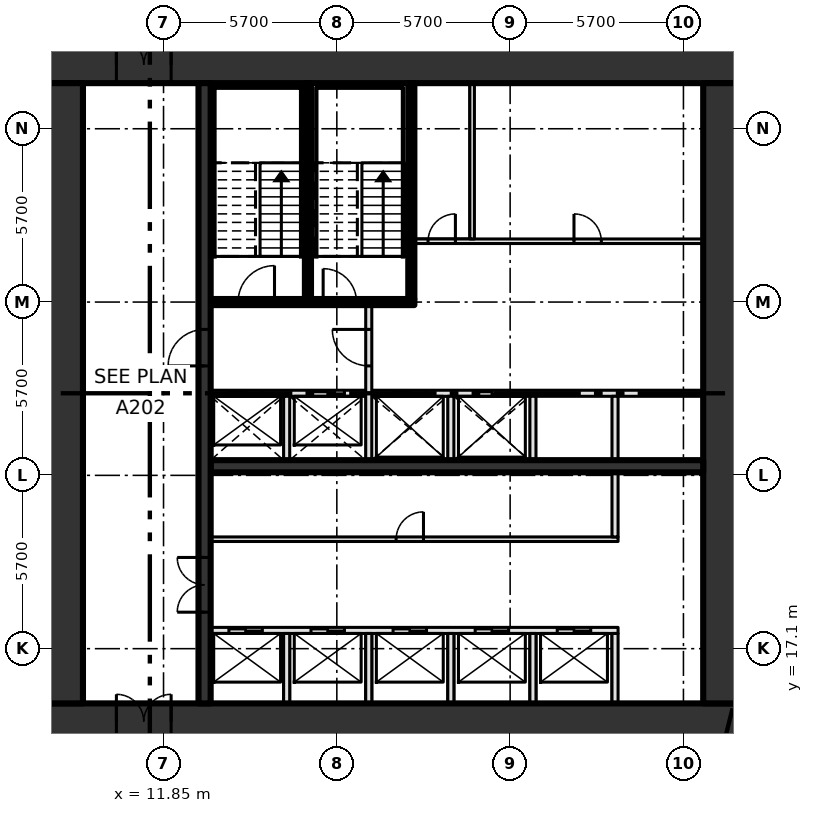
"""IFC4 building model, lengths in metres.
Left out: names, types, materials, properties, quantities, classifications, styles, units other than length and angle.
Written with IfcOpenShell. Run it as: python <this file> out.ifc"""

import sys

from ifc_helpers import new_model, si_unit, direction, frame, frame_2d, origin, place, context, subcontext, project, spatial, rectangle, extrude, element, fill, save


model = new_model("IFC4")
c1 = context("Model", 3, precision=1e-05, world=origin(), true_north=direction((0.0, 1.0)))
c2 = subcontext(c1, "Body", "Model", "MODEL_VIEW")
j1 = project(units=[si_unit("LENGTHUNIT", "METRE"), si_unit("PLANEANGLEUNIT", "RADIAN")], contexts=[c1])
p1 = place(None, origin())
s1 = spatial("IfcSite", under=j1, at=p1, CompositionType="ELEMENT")
p2 = place(p1, origin())
s2 = spatial("IfcBuilding", under=s1, at=p2, CompositionType="ELEMENT")
p3 = place(p2, frame((0.0, 0.0, -4.5)))
s3 = spatial("IfcBuildingStorey", under=s2, at=p3, CompositionType="ELEMENT", Elevation=-4.5)
p4 = place(p3, frame((8.0, 14.7, -0.45), z_axis=(0.0, 0.0, 1.0), x_axis=(1.0, 0.0, 0.0)))
e1 = element("IfcWall", 1, at=p4, inside=s3, PredefinedType="SHEAR", context=c2, shape_type="SweptSolid", body=[
    extrude(rectangle(XDim=22.8, YDim=1.2, at=frame_2d((11.4, 0.0))), origin(), (0.0, 0.0, 1.0), 4.5),
])
p5 = place(p4, frame((2.3, 0.0, 0.45)))
e2 = element("IfcOpeningElement", 2, at=p5, cuts=e1, PredefinedType="OPENING", context=c2, shape_type="SweptSolid", body=[
    extrude(rectangle(XDim=1.8, YDim=2.1, at=frame_2d((0.9, 1.05))), frame((0.0, 0.61, 0.0), z_axis=(0.0, -1.0, 0.0), x_axis=(1.0, 0.0, 0.0)), (0.0, 0.0, 1.0), 1.22),
])
p6 = place(p3, frame((8.0, 36.3, -0.45), z_axis=(0.0, 0.0, 1.0), x_axis=(1.0, 0.0, 0.0)))
e3 = element("IfcWall", 3, at=p6, inside=s3, PredefinedType="SHEAR", context=c2, shape_type="SweptSolid", body=[
    extrude(rectangle(XDim=22.8, YDim=1.2, at=frame_2d((11.4, 0.0))), origin(), (0.0, 0.0, 1.0), 4.5),
])
p7 = place(p6, frame((2.3, 0.0, 0.45)))
e4 = element("IfcOpeningElement", 4, at=p7, cuts=e3, PredefinedType="OPENING", context=c2, shape_type="SweptSolid", body=[
    extrude(rectangle(XDim=1.8, YDim=2.1, at=frame_2d((0.9, 1.05))), frame((0.0, 0.61, 0.0), z_axis=(0.0, -1.0, 0.0), x_axis=(1.0, 0.0, 0.0)), (0.0, 0.0, 1.0), 1.22),
])
for number, where, z_axis, x_axis in (
    (5, (8.6, 15.3, -0.45), (0.0, 0.0, 1.0), (0.0, 1.0, 0.0)),
    (6, (30.2, 15.3, -0.45), (0.0, 0.0, 1.0), (0.0, 1.0, 0.0)),
):
    element("IfcWall", number, at=place(p3, frame(where, z_axis=z_axis, x_axis=x_axis)), inside=s3, PredefinedType="SHEAR", context=c2, shape_type="SweptSolid", body=[
        extrude(rectangle(XDim=20.4, YDim=1.2, at=frame_2d((10.2, 0.0))), origin(), (0.0, 0.0, 1.0), 4.5),
    ])
p8 = place(p3, frame((13.4, 17.7, 0.0), z_axis=(0.0, 0.0, 1.0), x_axis=(1.0, 0.0, 0.0)))
e7 = element("IfcWall", 7, at=p8, inside=s3, PredefinedType="SOLIDWALL", context=c2, shape_type="SweptSolid", body=[
    extrude(rectangle(XDim=13.4, YDim=0.2, at=frame_2d((6.7, 0.0))), origin(), (0.0, 0.0, 1.0), 4.05),
])
p9 = place(p8, frame((0.6, 0.0, 0.0)))
e8 = element("IfcOpeningElement", 8, at=p9, cuts=e7, PredefinedType="OPENING", context=c2, shape_type="SweptSolid", body=[
    extrude(rectangle(XDim=1.1, YDim=2.1, at=frame_2d((0.55, 1.05))), frame((0.0, 0.11, 0.0), z_axis=(0.0, -1.0, 0.0), x_axis=(1.0, 0.0, 0.0)), (0.0, 0.0, 1.0), 0.22),
])
p10 = place(p8, frame((3.3, 0.0, 0.0)))
e9 = element("IfcOpeningElement", 9, at=p10, cuts=e7, PredefinedType="OPENING", context=c2, shape_type="SweptSolid", body=[
    extrude(rectangle(XDim=1.1, YDim=2.1, at=frame_2d((0.55, 1.05))), frame((0.0, 0.11, 0.0), z_axis=(0.0, -1.0, 0.0), x_axis=(1.0, 0.0, 0.0)), (0.0, 0.0, 1.0), 0.22),
])
p11 = place(p8, frame((6.0, 0.0, 0.0)))
e10 = element("IfcOpeningElement", 10, at=p11, cuts=e7, PredefinedType="OPENING", context=c2, shape_type="SweptSolid", body=[
    extrude(rectangle(XDim=1.1, YDim=2.1, at=frame_2d((0.55, 1.05))), frame((0.0, 0.11, 0.0), z_axis=(0.0, -1.0, 0.0), x_axis=(1.0, 0.0, 0.0)), (0.0, 0.0, 1.0), 0.22),
])
p12 = place(p8, frame((8.7, 0.0, 0.0)))
e11 = element("IfcOpeningElement", 11, at=p12, cuts=e7, PredefinedType="OPENING", context=c2, shape_type="SweptSolid", body=[
    extrude(rectangle(XDim=1.1, YDim=2.1, at=frame_2d((0.55, 1.05))), frame((0.0, 0.11, 0.0), z_axis=(0.0, -1.0, 0.0), x_axis=(1.0, 0.0, 0.0)), (0.0, 0.0, 1.0), 0.22),
])
p13 = place(p8, frame((11.4, 0.0, 0.0)))
e12 = element("IfcOpeningElement", 12, at=p13, cuts=e7, PredefinedType="OPENING", context=c2, shape_type="SweptSolid", body=[
    extrude(rectangle(XDim=1.1, YDim=2.1, at=frame_2d((0.55, 1.05))), frame((0.0, 0.11, 0.0), z_axis=(0.0, -1.0, 0.0), x_axis=(1.0, 0.0, 0.0)), (0.0, 0.0, 1.0), 0.22),
])
p14 = place(p3, frame((13.4, 20.7, 0.0), z_axis=(0.0, 0.0, 1.0), x_axis=(1.0, 0.0, 0.0)))
e13 = element("IfcWall", 13, at=p14, inside=s3, PredefinedType="PARTITIONING", context=c2, shape_type="SweptSolid", body=[
    extrude(rectangle(XDim=13.4, YDim=0.15, at=frame_2d((6.7, 0.0))), origin(), (0.0, 0.0, 1.0), 4.05),
])
p15 = place(p14, frame((6.1, 0.0, 0.0)))
e14 = element("IfcOpeningElement", 14, at=p15, cuts=e13, PredefinedType="OPENING", context=c2, shape_type="SweptSolid", body=[
    extrude(rectangle(XDim=0.9, YDim=2.1, at=frame_2d((0.45, 1.05))), frame((0.0, 0.085, 0.0), z_axis=(0.0, -1.0, 0.0), x_axis=(1.0, 0.0, 0.0)), (0.0, 0.0, 1.0), 0.17),
])
p16 = place(p3, frame((13.4, 23.1, 0.0), z_axis=(0.0, 0.0, 1.0), x_axis=(1.0, 0.0, 0.0)))
e15 = element("IfcWall", 15, at=p16, inside=s3, PredefinedType="SHEAR", context=c2, shape_type="SweptSolid", body=[
    extrude(rectangle(XDim=16.2, YDim=0.4, at=frame_2d((8.1, 0.0))), origin(), (0.0, 0.0, 1.0), 4.05),
])
p17 = place(p3, frame((13.4, 25.5, 0.0), z_axis=(0.0, 0.0, 1.0), x_axis=(1.0, 0.0, 0.0)))
e16 = element("IfcWall", 16, at=p17, inside=s3, PredefinedType="SOLIDWALL", context=c2, shape_type="SweptSolid", body=[
    extrude(rectangle(XDim=16.2, YDim=0.2, at=frame_2d((8.1, 0.0))), origin(), (0.0, 0.0, 1.0), 4.05),
])
p18 = place(p17, frame((0.6, 0.0, 0.0)))
e17 = element("IfcOpeningElement", 17, at=p18, cuts=e16, PredefinedType="OPENING", context=c2, shape_type="SweptSolid", body=[
    extrude(rectangle(XDim=1.1, YDim=2.1, at=frame_2d((0.55, 1.05))), frame((0.0, 0.11, 0.0), z_axis=(0.0, -1.0, 0.0), x_axis=(1.0, 0.0, 0.0)), (0.0, 0.0, 1.0), 0.22),
])
p19 = place(p17, frame((3.3, 0.0, 0.0)))
e18 = element("IfcOpeningElement", 18, at=p19, cuts=e16, PredefinedType="OPENING", context=c2, shape_type="SweptSolid", body=[
    extrude(rectangle(XDim=1.1, YDim=2.1, at=frame_2d((0.55, 1.05))), frame((0.0, 0.11, 0.0), z_axis=(0.0, -1.0, 0.0), x_axis=(1.0, 0.0, 0.0)), (0.0, 0.0, 1.0), 0.22),
])
p20 = place(p17, frame((6.0, 0.0, 0.0)))
e19 = element("IfcOpeningElement", 19, at=p20, cuts=e16, PredefinedType="OPENING", context=c2, shape_type="SweptSolid", body=[
    extrude(rectangle(XDim=1.1, YDim=2.1, at=frame_2d((0.55, 1.05))), frame((0.0, 0.11, 0.0), z_axis=(0.0, -1.0, 0.0), x_axis=(1.0, 0.0, 0.0)), (0.0, 0.0, 1.0), 0.22),
])
p21 = place(p17, frame((8.7, 0.0, 0.0)))
e20 = element("IfcOpeningElement", 20, at=p21, cuts=e16, PredefinedType="OPENING", context=c2, shape_type="SweptSolid", body=[
    extrude(rectangle(XDim=1.1, YDim=2.1, at=frame_2d((0.55, 1.05))), frame((0.0, 0.11, 0.0), z_axis=(0.0, -1.0, 0.0), x_axis=(1.0, 0.0, 0.0)), (0.0, 0.0, 1.0), 0.22),
])
p22 = place(p3, frame((13.4, 28.5, 0.0), z_axis=(0.0, 0.0, 1.0), x_axis=(1.0, 0.0, 0.0)))
e21 = element("IfcWall", 21, at=p22, inside=s3, PredefinedType="SOLIDWALL", context=c2, shape_type="SweptSolid", body=[
    extrude(rectangle(XDim=6.7, YDim=0.2, at=frame_2d((3.35, 0.0))), origin(), (0.0, 0.0, 1.0), 4.05),
])
p23 = place(p22, frame((0.9, 0.0, 0.0)))
e22 = element("IfcOpeningElement", 22, at=p23, cuts=e21, PredefinedType="OPENING", context=c2, shape_type="SweptSolid", body=[
    extrude(rectangle(XDim=1.2, YDim=2.1, at=frame_2d((0.6, 1.05))), frame((0.0, 0.11, 0.0), z_axis=(0.0, -1.0, 0.0), x_axis=(1.0, 0.0, 0.0)), (0.0, 0.0, 1.0), 0.22),
])
p24 = place(p22, frame((3.7, 0.0, 0.0)))
e23 = element("IfcOpeningElement", 23, at=p24, cuts=e21, PredefinedType="OPENING", context=c2, shape_type="SweptSolid", body=[
    extrude(rectangle(XDim=1.1, YDim=2.1, at=frame_2d((0.55, 1.05))), frame((0.0, 0.11, 0.0), z_axis=(0.0, -1.0, 0.0), x_axis=(1.0, 0.0, 0.0)), (0.0, 0.0, 1.0), 0.22),
])
p25 = place(p3, frame((20.1, 30.5, 0.0), z_axis=(0.0, 0.0, 1.0), x_axis=(1.0, 0.0, 0.0)))
e24 = element("IfcWall", 24, at=p25, inside=s3, PredefinedType="PARTITIONING", context=c2, shape_type="SweptSolid", body=[
    extrude(rectangle(XDim=9.5, YDim=0.15, at=frame_2d((4.75, 0.0))), origin(), (0.0, 0.0, 1.0), 4.05),
])
p26 = place(p25, frame((0.45, 0.0, 0.0)))
e25 = element("IfcOpeningElement", 25, at=p26, cuts=e24, PredefinedType="OPENING", context=c2, shape_type="SweptSolid", body=[
    extrude(rectangle(XDim=0.9, YDim=2.1, at=frame_2d((0.45, 1.05))), frame((0.0, 0.085, 0.0), z_axis=(0.0, -1.0, 0.0), x_axis=(1.0, 0.0, 0.0)), (0.0, 0.0, 1.0), 0.17),
])
p27 = place(p25, frame((5.25, 0.0, 0.0)))
e26 = element("IfcOpeningElement", 26, at=p27, cuts=e24, PredefinedType="OPENING", context=c2, shape_type="SweptSolid", body=[
    extrude(rectangle(XDim=0.9, YDim=2.1, at=frame_2d((0.45, 1.05))), frame((0.0, 0.085, 0.0), z_axis=(0.0, -1.0, 0.0), x_axis=(1.0, 0.0, 0.0)), (0.0, 0.0, 1.0), 0.17),
])
p28 = place(p3, frame((13.2, 15.3, 0.0), z_axis=(0.0, 0.0, 1.0), x_axis=(0.0, 1.0, 0.0)))
e27 = element("IfcWall", 27, at=p28, inside=s3, PredefinedType="SHEAR", context=c2, shape_type="SweptSolid", body=[
    extrude(rectangle(XDim=20.4, YDim=0.4, at=frame_2d((10.2, 0.0))), origin(), (0.0, 0.0, 1.0), 4.05),
])
p29 = place(p28, frame((3.0, 0.0, 0.0)))
e28 = element("IfcOpeningElement", 28, at=p29, cuts=e27, PredefinedType="OPENING", context=c2, shape_type="SweptSolid", body=[
    extrude(rectangle(XDim=1.8, YDim=2.1, at=frame_2d((0.9, 1.05))), frame((0.0, 0.21, 0.0), z_axis=(0.0, -1.0, 0.0), x_axis=(1.0, 0.0, 0.0)), (0.0, 0.0, 1.0), 0.42),
])
p30 = place(p28, frame((11.1, 0.0, 0.0)))
e29 = element("IfcOpeningElement", 29, at=p30, cuts=e27, PredefinedType="OPENING", context=c2, shape_type="SweptSolid", body=[
    extrude(rectangle(XDim=1.2, YDim=2.1, at=frame_2d((0.6, 1.05))), frame((0.0, 0.21, 0.0), z_axis=(0.0, -1.0, 0.0), x_axis=(1.0, 0.0, 0.0)), (0.0, 0.0, 1.0), 0.42),
])
p31 = place(p3, frame((15.9, 15.3, 0.0), z_axis=(0.0, 0.0, 1.0), x_axis=(0.0, 1.0, 0.0)))
e30 = element("IfcWall", 30, at=p31, inside=s3, PredefinedType="SOLIDWALL", context=c2, shape_type="SweptSolid", body=[
    extrude(rectangle(XDim=2.3, YDim=0.2, at=frame_2d((1.15, 0.0))), origin(), (0.0, 0.0, 1.0), 4.05),
])
p32 = place(p3, frame((15.9, 23.3, 0.0), z_axis=(0.0, 0.0, 1.0), x_axis=(0.0, 1.0, 0.0)))
e31 = element("IfcWall", 31, at=p32, inside=s3, PredefinedType="SOLIDWALL", context=c2, shape_type="SweptSolid", body=[
    extrude(rectangle(XDim=2.1, YDim=0.2, at=frame_2d((1.05, 0.0))), origin(), (0.0, 0.0, 1.0), 4.05),
])
p33 = place(p3, frame((16.6, 28.6, 0.0), z_axis=(0.0, 0.0, 1.0), x_axis=(0.0, 1.0, 0.0)))
e32 = element("IfcWall", 32, at=p33, inside=s3, PredefinedType="SOLIDWALL", context=c2, shape_type="SweptSolid", body=[
    extrude(rectangle(XDim=7.1, YDim=0.2, at=frame_2d((3.55, 0.0))), origin(), (0.0, 0.0, 1.0), 4.05),
])
p34 = place(p3, frame((18.6, 15.3, 0.0), z_axis=(0.0, 0.0, 1.0), x_axis=(0.0, 1.0, 0.0)))
e33 = element("IfcWall", 33, at=p34, inside=s3, PredefinedType="SOLIDWALL", context=c2, shape_type="SweptSolid", body=[
    extrude(rectangle(XDim=2.3, YDim=0.2, at=frame_2d((1.15, 0.0))), origin(), (0.0, 0.0, 1.0), 4.05),
])
p35 = place(p3, frame((18.6, 23.3, 0.0), z_axis=(0.0, 0.0, 1.0), x_axis=(0.0, 1.0, 0.0)))
e34 = element("IfcWall", 34, at=p35, inside=s3, PredefinedType="SOLIDWALL", context=c2, shape_type="SweptSolid", body=[
    extrude(rectangle(XDim=5.1, YDim=0.2, at=frame_2d((2.55, 0.0))), origin(), (0.0, 0.0, 1.0), 4.05),
])
p36 = place(p35, frame((3.1, 0.0, 0.0)))
e35 = element("IfcOpeningElement", 35, at=p36, cuts=e34, PredefinedType="OPENING", context=c2, shape_type="SweptSolid", body=[
    extrude(rectangle(XDim=1.2, YDim=2.1, at=frame_2d((0.6, 1.05))), frame((0.0, 0.11, 0.0), z_axis=(0.0, -1.0, 0.0), x_axis=(1.0, 0.0, 0.0)), (0.0, 0.0, 1.0), 0.22),
])
p37 = place(p3, frame((20.0, 28.6, 0.0), z_axis=(0.0, 0.0, 1.0), x_axis=(0.0, 1.0, 0.0)))
e36 = element("IfcWall", 36, at=p37, inside=s3, PredefinedType="SOLIDWALL", context=c2, shape_type="SweptSolid", body=[
    extrude(rectangle(XDim=7.1, YDim=0.2, at=frame_2d((3.55, 0.0))), origin(), (0.0, 0.0, 1.0), 4.05),
])
p38 = place(p3, frame((21.3, 15.3, 0.0), z_axis=(0.0, 0.0, 1.0), x_axis=(0.0, 1.0, 0.0)))
e37 = element("IfcWall", 37, at=p38, inside=s3, PredefinedType="SOLIDWALL", context=c2, shape_type="SweptSolid", body=[
    extrude(rectangle(XDim=2.3, YDim=0.2, at=frame_2d((1.15, 0.0))), origin(), (0.0, 0.0, 1.0), 4.05),
])
p39 = place(p3, frame((21.3, 23.3, 0.0), z_axis=(0.0, 0.0, 1.0), x_axis=(0.0, 1.0, 0.0)))
e38 = element("IfcWall", 38, at=p39, inside=s3, PredefinedType="SOLIDWALL", context=c2, shape_type="SweptSolid", body=[
    extrude(rectangle(XDim=2.1, YDim=0.2, at=frame_2d((1.05, 0.0))), origin(), (0.0, 0.0, 1.0), 4.05),
])
p40 = place(p3, frame((22.0, 30.575, 0.0), z_axis=(0.0, 0.0, 1.0), x_axis=(0.0, 1.0, 0.0)))
e39 = element("IfcWall", 39, at=p40, inside=s3, PredefinedType="PARTITIONING", context=c2, shape_type="SweptSolid", body=[
    extrude(rectangle(XDim=5.125, YDim=0.15, at=frame_2d((2.562, 0.0))), origin(), (0.0, 0.0, 1.0), 4.05),
])
p41 = place(p3, frame((24.0, 15.3, 0.0), z_axis=(0.0, 0.0, 1.0), x_axis=(0.0, 1.0, 0.0)))
e40 = element("IfcWall", 40, at=p41, inside=s3, PredefinedType="SOLIDWALL", context=c2, shape_type="SweptSolid", body=[
    extrude(rectangle(XDim=2.3, YDim=0.2, at=frame_2d((1.15, 0.0))), origin(), (0.0, 0.0, 1.0), 4.05),
])
p42 = place(p3, frame((24.0, 23.3, 0.0), z_axis=(0.0, 0.0, 1.0), x_axis=(0.0, 1.0, 0.0)))
e41 = element("IfcWall", 41, at=p42, inside=s3, PredefinedType="SOLIDWALL", context=c2, shape_type="SweptSolid", body=[
    extrude(rectangle(XDim=2.1, YDim=0.2, at=frame_2d((1.05, 0.0))), origin(), (0.0, 0.0, 1.0), 4.05),
])
p43 = place(p3, frame((26.7, 15.3, 0.0), z_axis=(0.0, 0.0, 1.0), x_axis=(0.0, 1.0, 0.0)))
e42 = element("IfcWall", 42, at=p43, inside=s3, PredefinedType="SOLIDWALL", context=c2, shape_type="SweptSolid", body=[
    extrude(rectangle(XDim=2.3, YDim=0.2, at=frame_2d((1.15, 0.0))), origin(), (0.0, 0.0, 1.0), 4.05),
])
p44 = place(p3, frame((26.7, 20.775, 0.0), z_axis=(0.0, 0.0, 1.0), x_axis=(0.0, 1.0, 0.0)))
e43 = element("IfcWall", 43, at=p44, inside=s3, PredefinedType="SOLIDWALL", context=c2, shape_type="SweptSolid", body=[
    extrude(rectangle(XDim=4.625, YDim=0.2, at=frame_2d((2.312, 0.0))), origin(), (0.0, 0.0, 1.0), 4.05),
])
p45 = place(p9, origin())
e44 = element("IfcDoor", 44, at=p45, inside=s3, OperationType="SLIDING_TO_LEFT", PredefinedType="DOOR", context=c2, shape_type="SweptSolid", body=[
    extrude(rectangle(XDim=1.1, YDim=2.1, at=frame_2d((0.55, 1.05))), frame((0.0, 0.025, 0.0), z_axis=(0.0, -1.0, 0.0), x_axis=(1.0, 0.0, 0.0)), (0.0, 0.0, 1.0), 0.05),
])
fill(e8, e44)
p46 = place(p10, origin())
e45 = element("IfcDoor", 45, at=p46, inside=s3, OperationType="SLIDING_TO_LEFT", PredefinedType="DOOR", context=c2, shape_type="SweptSolid", body=[
    extrude(rectangle(XDim=1.1, YDim=2.1, at=frame_2d((0.55, 1.05))), frame((0.0, 0.025, 0.0), z_axis=(0.0, -1.0, 0.0), x_axis=(1.0, 0.0, 0.0)), (0.0, 0.0, 1.0), 0.05),
])
fill(e9, e45)
p47 = place(p11, origin())
e46 = element("IfcDoor", 46, at=p47, inside=s3, OperationType="SLIDING_TO_LEFT", PredefinedType="DOOR", context=c2, shape_type="SweptSolid", body=[
    extrude(rectangle(XDim=1.1, YDim=2.1, at=frame_2d((0.55, 1.05))), frame((0.0, 0.025, 0.0), z_axis=(0.0, -1.0, 0.0), x_axis=(1.0, 0.0, 0.0)), (0.0, 0.0, 1.0), 0.05),
])
fill(e10, e46)
p48 = place(p12, origin())
e47 = element("IfcDoor", 47, at=p48, inside=s3, OperationType="SLIDING_TO_LEFT", PredefinedType="DOOR", context=c2, shape_type="SweptSolid", body=[
    extrude(rectangle(XDim=1.1, YDim=2.1, at=frame_2d((0.55, 1.05))), frame((0.0, 0.025, 0.0), z_axis=(0.0, -1.0, 0.0), x_axis=(1.0, 0.0, 0.0)), (0.0, 0.0, 1.0), 0.05),
])
fill(e11, e47)
p49 = place(p13, origin())
e48 = element("IfcDoor", 48, at=p49, inside=s3, OperationType="SLIDING_TO_LEFT", PredefinedType="DOOR", context=c2, shape_type="SweptSolid", body=[
    extrude(rectangle(XDim=1.1, YDim=2.1, at=frame_2d((0.55, 1.05))), frame((0.0, 0.025, 0.0), z_axis=(0.0, -1.0, 0.0), x_axis=(1.0, 0.0, 0.0)), (0.0, 0.0, 1.0), 0.05),
])
fill(e12, e48)
p50 = place(p18, origin())
e49 = element("IfcDoor", 49, at=p50, inside=s3, OperationType="SLIDING_TO_LEFT", PredefinedType="DOOR", context=c2, shape_type="SweptSolid", body=[
    extrude(rectangle(XDim=1.1, YDim=2.1, at=frame_2d((0.55, 1.05))), frame((0.0, 0.025, 0.0), z_axis=(0.0, -1.0, 0.0), x_axis=(1.0, 0.0, 0.0)), (0.0, 0.0, 1.0), 0.05),
])
fill(e17, e49)
p51 = place(p19, origin())
e50 = element("IfcDoor", 50, at=p51, inside=s3, OperationType="SLIDING_TO_LEFT", PredefinedType="DOOR", context=c2, shape_type="SweptSolid", body=[
    extrude(rectangle(XDim=1.1, YDim=2.1, at=frame_2d((0.55, 1.05))), frame((0.0, 0.025, 0.0), z_axis=(0.0, -1.0, 0.0), x_axis=(1.0, 0.0, 0.0)), (0.0, 0.0, 1.0), 0.05),
])
fill(e18, e50)
p52 = place(p20, origin())
e51 = element("IfcDoor", 51, at=p52, inside=s3, OperationType="SLIDING_TO_LEFT", PredefinedType="DOOR", context=c2, shape_type="SweptSolid", body=[
    extrude(rectangle(XDim=1.1, YDim=2.1, at=frame_2d((0.55, 1.05))), frame((0.0, 0.025, 0.0), z_axis=(0.0, -1.0, 0.0), x_axis=(1.0, 0.0, 0.0)), (0.0, 0.0, 1.0), 0.05),
])
fill(e19, e51)
p53 = place(p21, origin())
e52 = element("IfcDoor", 52, at=p53, inside=s3, OperationType="SLIDING_TO_LEFT", PredefinedType="DOOR", context=c2, shape_type="SweptSolid", body=[
    extrude(rectangle(XDim=1.1, YDim=2.1, at=frame_2d((0.55, 1.05))), frame((0.0, 0.025, 0.0), z_axis=(0.0, -1.0, 0.0), x_axis=(1.0, 0.0, 0.0)), (0.0, 0.0, 1.0), 0.05),
])
fill(e20, e52)
p54 = place(p15, origin())
e53 = element("IfcDoor", 53, at=p54, inside=s3, OperationType="SINGLE_SWING_RIGHT", PredefinedType="DOOR", context=c2, shape_type="SweptSolid", body=[
    extrude(rectangle(XDim=0.9, YDim=2.1, at=frame_2d((0.45, 1.05))), frame((0.0, 0.025, 0.0), z_axis=(0.0, -1.0, 0.0), x_axis=(1.0, 0.0, 0.0)), (0.0, 0.0, 1.0), 0.05),
])
fill(e14, e53)
p55 = place(p26, origin())
e54 = element("IfcDoor", 54, at=p55, inside=s3, OperationType="SINGLE_SWING_RIGHT", PredefinedType="DOOR", context=c2, shape_type="SweptSolid", body=[
    extrude(rectangle(XDim=0.9, YDim=2.1, at=frame_2d((0.45, 1.05))), frame((0.0, 0.025, 0.0), z_axis=(0.0, -1.0, 0.0), x_axis=(1.0, 0.0, 0.0)), (0.0, 0.0, 1.0), 0.05),
])
fill(e25, e54)
p56 = place(p27, origin())
e55 = element("IfcDoor", 55, at=p56, inside=s3, OperationType="SINGLE_SWING_LEFT", PredefinedType="DOOR", context=c2, shape_type="SweptSolid", body=[
    extrude(rectangle(XDim=0.9, YDim=2.1, at=frame_2d((0.45, 1.05))), frame((0.0, 0.025, 0.0), z_axis=(0.0, -1.0, 0.0), x_axis=(1.0, 0.0, 0.0)), (0.0, 0.0, 1.0), 0.05),
])
fill(e26, e55)
p57 = place(p23, origin())
e56 = element("IfcDoor", 56, at=p57, inside=s3, OperationType="SINGLE_SWING_RIGHT", PredefinedType="DOOR", context=c2, shape_type="SweptSolid", body=[
    extrude(rectangle(XDim=1.2, YDim=2.1, at=frame_2d((0.6, 1.05))), frame((0.0, 0.025, 0.0), z_axis=(0.0, -1.0, 0.0), x_axis=(1.0, 0.0, 0.0)), (0.0, 0.0, 1.0), 0.05),
])
fill(e22, e56)
p58 = place(p24, origin())
e57 = element("IfcDoor", 57, at=p58, inside=s3, OperationType="SINGLE_SWING_LEFT", PredefinedType="DOOR", context=c2, shape_type="SweptSolid", body=[
    extrude(rectangle(XDim=1.1, YDim=2.1, at=frame_2d((0.55, 1.05))), frame((0.0, 0.025, 0.0), z_axis=(0.0, -1.0, 0.0), x_axis=(1.0, 0.0, 0.0)), (0.0, 0.0, 1.0), 0.05),
])
fill(e23, e57)
p59 = place(p29, origin())
e58 = element("IfcDoor", 58, at=p59, inside=s3, OperationType="DOUBLE_DOOR_SINGLE_SWING", PredefinedType="DOOR", context=c2, shape_type="SweptSolid", body=[
    extrude(rectangle(XDim=1.8, YDim=2.1, at=frame_2d((0.9, 1.05))), frame((0.0, 0.025, 0.0), z_axis=(0.0, -1.0, 0.0), x_axis=(1.0, 0.0, 0.0)), (0.0, 0.0, 1.0), 0.05),
])
fill(e28, e58)
p60 = place(p30, origin())
e59 = element("IfcDoor", 59, at=p60, inside=s3, OperationType="SINGLE_SWING_LEFT", PredefinedType="DOOR", context=c2, shape_type="SweptSolid", body=[
    extrude(rectangle(XDim=1.2, YDim=2.1, at=frame_2d((0.6, 1.05))), frame((0.0, 0.025, 0.0), z_axis=(0.0, -1.0, 0.0), x_axis=(1.0, 0.0, 0.0)), (0.0, 0.0, 1.0), 0.05),
])
fill(e29, e59)
p61 = place(p36, origin())
e60 = element("IfcDoor", 60, at=p61, inside=s3, OperationType="SINGLE_SWING_RIGHT", PredefinedType="DOOR", context=c2, shape_type="SweptSolid", body=[
    extrude(rectangle(XDim=1.2, YDim=2.1, at=frame_2d((0.6, 1.05))), frame((0.0, 0.025, 0.0), z_axis=(0.0, -1.0, 0.0), x_axis=(1.0, 0.0, 0.0)), (0.0, 0.0, 1.0), 0.05),
])
fill(e35, e60)
p62 = place(p7, origin())
e61 = element("IfcDoor", 61, at=p62, inside=s3, OperationType="DOUBLE_DOOR_SINGLE_SWING", PredefinedType="DOOR", context=c2, shape_type="SweptSolid", body=[
    extrude(rectangle(XDim=1.8, YDim=2.1, at=frame_2d((0.9, 1.05))), frame((0.0, 0.025, 0.0), z_axis=(0.0, -1.0, 0.0), x_axis=(1.0, 0.0, 0.0)), (0.0, 0.0, 1.0), 0.05),
])
fill(e4, e61)
p63 = place(p5, origin())
e62 = element("IfcDoor", 62, at=p63, inside=s3, OperationType="DOUBLE_DOOR_SINGLE_SWING", PredefinedType="DOOR", context=c2, shape_type="SweptSolid", body=[
    extrude(rectangle(XDim=1.8, YDim=2.1, at=frame_2d((0.9, 1.05))), frame((0.0, 0.025, 0.0), z_axis=(0.0, -1.0, 0.0), x_axis=(1.0, 0.0, 0.0)), (0.0, 0.0, 1.0), 0.05),
])
fill(e2, e62)
save(model, sys.argv[1])
